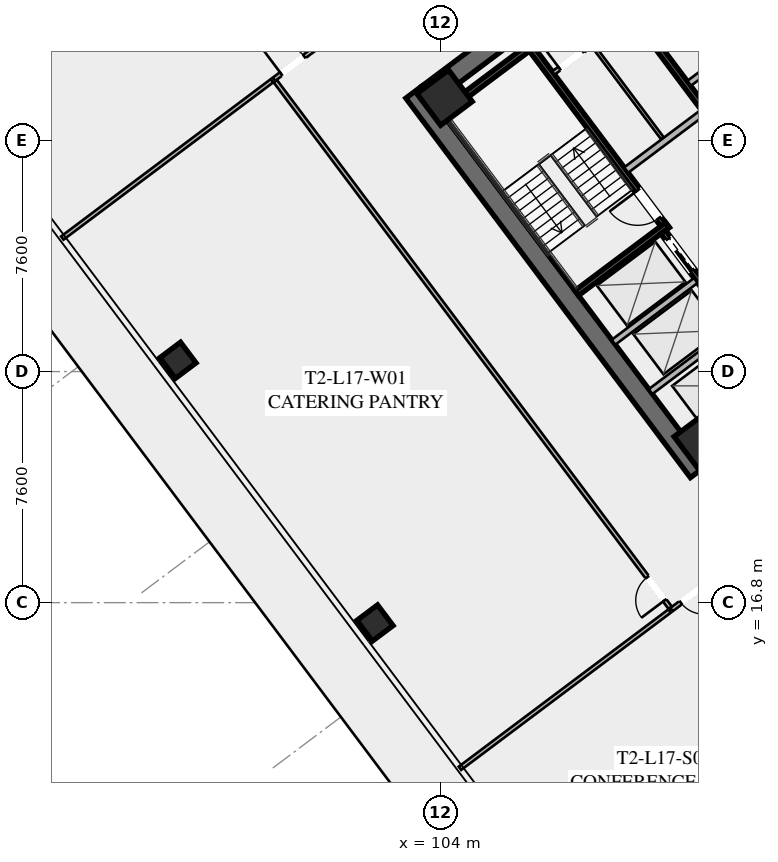
"""IFC4 building model, lengths in metres.
Left out: names, types, materials, properties, quantities, classifications, styles, units other than length and angle.
Written with IfcOpenShell. Run it as: python <this file> out.ifc"""

import sys

from ifc_helpers import new_model, si_unit, direction, frame, frame_2d, origin, origin_2d, place, context, subcontext, project, spatial, rectangle, hollow_rectangle, extrude, element, fill, save


model = new_model("IFC4")
c1 = context("Model", 3, precision=1e-05, world=origin(), true_north=direction((0.0, 1.0)))
c2 = subcontext(c1, "Body", "Model", "MODEL_VIEW")
j1 = project(units=[si_unit("LENGTHUNIT", "METRE"), si_unit("PLANEANGLEUNIT", "RADIAN")], contexts=[c1])
p1 = place(None, origin())
s1 = spatial("IfcSite", under=j1, at=p1, CompositionType="ELEMENT")
p2 = place(p1, origin())
s2 = spatial("IfcBuilding", under=s1, at=p2, CompositionType="ELEMENT")
p3 = place(p2, frame((0.0, 0.0, 67.2)))
s3 = spatial("IfcBuildingStorey", under=s2, at=p3, CompositionType="ELEMENT", Elevation=67.2)
p4 = place(p3, frame((112.476, 21.107, 0.0), z_axis=(0.0, 0.0, 1.0), x_axis=(-0.600005007985, 0.799996243986, 0.0)))
e1 = element("IfcWall", 1, at=p4, inside=s3, PredefinedType="SHEAR", context=c2, shape_type="SweptSolid", body=[
    extrude(rectangle(XDim=15.6, YDim=0.65, at=frame_2d((7.8, 0.0))), origin(), (0.0, 0.0, 1.0), 3.55),
])
p5 = place(p3, frame((124.429, 30.478, 0.0), z_axis=(0.0, 0.0, 1.0), x_axis=(-0.799998028465, -0.600002628705, 0.0)))
e2 = element("IfcWall", 2, at=p5, inside=s3, PredefinedType="SHEAR", context=c2, shape_type="SweptSolid", body=[
    extrude(rectangle(XDim=14.86, YDim=0.65, at=frame_2d((7.43, 0.0))), origin(), (0.0, 0.0, 1.0), 3.55),
])
p6 = place(p5, frame((9.13, 0.0, 0.0)))
e3 = element("IfcOpeningElement", 3, at=p6, cuts=e2, PredefinedType="OPENING", context=c2, shape_type="SweptSolid", body=[
    extrude(rectangle(XDim=1.25, YDim=2.25, at=frame_2d((0.625, 1.125))), frame((0.0, 0.335, 0.0), z_axis=(0.0, -1.0, 0.0), x_axis=(1.0, 0.0, 0.0)), (0.0, 0.0, 1.0), 0.67),
])
p7 = place(p5, frame((4.08, 0.0, 0.0)))
e4 = element("IfcOpeningElement", 4, at=p7, cuts=e2, PredefinedType="OPENING", context=c2, shape_type="SweptSolid", body=[
    extrude(rectangle(XDim=1.25, YDim=2.25, at=frame_2d((0.625, 1.125))), frame((0.0, 0.335, 0.0), z_axis=(0.0, -1.0, 0.0), x_axis=(1.0, 0.0, 0.0)), (0.0, 0.0, 1.0), 0.67),
])
p8 = place(p3, frame((103.571, 33.522, 0.0), z_axis=(0.0, 0.0, 1.0), x_axis=(0.799998028465, 0.600002628705, 0.0)))
e5 = element("IfcWall", 5, at=p8, inside=s3, PredefinedType="SHEAR", context=c2, shape_type="SweptSolid", body=[
    extrude(rectangle(XDim=14.86, YDim=0.65, at=frame_2d((7.43, 0.0))), origin(), (0.0, 0.0, 1.0), 3.55),
])
p9 = place(p8, frame((4.48, 0.0, 0.0)))
e6 = element("IfcOpeningElement", 6, at=p9, cuts=e5, PredefinedType="OPENING", context=c2, shape_type="SweptSolid", body=[
    extrude(rectangle(XDim=1.25, YDim=2.25, at=frame_2d((0.625, 1.125))), frame((0.0, 0.335, 0.0), z_axis=(0.0, -1.0, 0.0), x_axis=(1.0, 0.0, 0.0)), (0.0, 0.0, 1.0), 0.67),
])
p10 = place(p8, frame((9.53, 0.0, 0.0)))
e7 = element("IfcOpeningElement", 7, at=p10, cuts=e5, PredefinedType="OPENING", context=c2, shape_type="SweptSolid", body=[
    extrude(rectangle(XDim=1.25, YDim=2.25, at=frame_2d((0.625, 1.125))), frame((0.0, 0.335, 0.0), z_axis=(0.0, -1.0, 0.0), x_axis=(1.0, 0.0, 0.0)), (0.0, 0.0, 1.0), 0.67),
])
for number, where, z_axis, x_axis in (
    (8, (112.59, 22.13, 0.0), (0.0, 0.0, 1.0), (0.8, 0.6, 0.0)),
    (9, (104.13, 33.41, 0.0), (0.0, 0.0, 1.0), (0.8, 0.6, 0.0)),
):
    element("IfcColumn", number, at=place(p3, frame(where, z_axis=z_axis, x_axis=x_axis)), inside=s3, PredefinedType="COLUMN", context=c2, shape_type="SweptSolid", body=[
        extrude(hollow_rectangle(XDim=1.3, YDim=1.3, WallThickness=0.05, at=origin_2d()), origin(), (0.0, 0.0, 1.0), 3.35),
    ])
for number, where, z_axis, x_axis in (
    (10, (95.36, 24.77, -0.195), (0.0, 0.0, 1.0), (0.8, 0.6, 0.0)),
    (11, (101.84, 16.13, -0.195), (0.0, 0.0, 1.0), (0.8, 0.6, 0.0)),
):
    element("IfcColumn", number, at=place(p3, frame(where, z_axis=z_axis, x_axis=x_axis)), inside=s3, PredefinedType="COLUMN", context=c2, shape_type="SweptSolid", body=[
        extrude(hollow_rectangle(XDim=0.85, YDim=0.85, WallThickness=0.035, at=origin_2d()), origin(), (0.0, 0.0, 1.0), 3.545),
    ])
p11 = place(p3, frame((111.44, 29.08, 0.0), z_axis=(0.0, 0.0, 1.0), x_axis=(-0.600009827119, 0.799992629566, 0.0)))
e12 = element("IfcWall", 12, at=p11, inside=s3, PredefinedType="SHEAR", context=c2, shape_type="SweptSolid", body=[
    extrude(rectangle(XDim=7.95, YDim=0.2, at=frame_2d((3.975, 0.0))), origin(), (0.0, 0.0, 1.0), 3.35),
])
p12 = place(p11, frame((0.45, 0.0, 0.0)))
e13 = element("IfcOpeningElement", 13, at=p12, cuts=e12, PredefinedType="OPENING", context=c2, shape_type="SweptSolid", body=[
    extrude(rectangle(XDim=1.15, YDim=2.2, at=frame_2d((0.575, 1.1))), frame((0.0, 0.11, 0.0), z_axis=(0.0, -1.0, 0.0), x_axis=(1.0, 0.0, 0.0)), (0.0, 0.0, 1.0), 0.22),
])
for number, where, z_axis, x_axis in (
    (14, (108.476, 26.982, 0.0), (0.0, 0.0, 1.0), (0.8, 0.6, 0.0)),
    (15, (104.036, 32.902, 0.0), (0.0, 0.0, 1.0), (0.8, 0.6, 0.0)),
):
    element("IfcWall", number, at=place(p3, frame(where, z_axis=z_axis, x_axis=x_axis)), inside=s3, PredefinedType="SHEAR", context=c2, shape_type="SweptSolid", body=[
        extrude(rectangle(XDim=3.73, YDim=0.2, at=frame_2d((1.865, 0.0))), origin(), (0.0, 0.0, 1.0), 3.35),
    ])
p13 = place(p3, frame((117.938, 26.016, 0.0), z_axis=(0.0, 0.0, 1.0), x_axis=(-0.600005463273, 0.799995902516, 0.0)))
e16 = element("IfcWall", 16, at=p13, inside=s3, PredefinedType="SHEAR", context=c2, shape_type="SweptSolid", body=[
    extrude(rectangle(XDim=14.3, YDim=0.2, at=frame_2d((7.15, 0.0))), origin(), (0.0, 0.0, 1.0), 3.35),
])
p14 = place(p3, frame((110.104, 31.028, 0.0), z_axis=(0.0, 0.0, 1.0), x_axis=(0.800018601094, 0.59997519774, 0.0)))
e17 = element("IfcWall", 17, at=p14, inside=s3, PredefinedType="SOLIDWALL", context=c2, shape_type="SweptSolid", body=[
    extrude(rectangle(XDim=3.15, YDim=0.22, at=frame_2d((1.575, 0.0))), origin(), (0.0, 0.0, 1.0), 2.703),
])
p15 = place(p3, frame((115.13, 23.91, 0.0), z_axis=(0.0, 0.0, 1.0), x_axis=(-0.599975393228, 0.800018454488, 0.0)))
e18 = element("IfcWall", 18, at=p15, inside=s3, PredefinedType="SHEAR", context=c2, shape_type="SweptSolid", body=[
    extrude(rectangle(XDim=6.35, YDim=0.2, at=frame_2d((3.175, 0.0))), origin(), (0.0, 0.0, 1.0), 3.35),
])
p16 = place(p15, frame((4.775, 0.0, 0.0)))
e19 = element("IfcOpeningElement", 19, at=p16, cuts=e18, PredefinedType="OPENING", context=c2, shape_type="SweptSolid", body=[
    extrude(rectangle(XDim=1.3, YDim=2.25, at=frame_2d((0.65, 1.125))), frame((0.0, 0.11, 0.0), z_axis=(0.0, -1.0, 0.0), x_axis=(1.0, 0.0, 0.0)), (0.0, 0.0, 1.0), 0.22),
])
p17 = place(p15, frame((2.775, 0.0, 0.0)))
e20 = element("IfcOpeningElement", 20, at=p17, cuts=e18, PredefinedType="OPENING", context=c2, shape_type="SweptSolid", body=[
    extrude(rectangle(XDim=1.3, YDim=2.25, at=frame_2d((0.65, 1.125))), frame((0.0, 0.11, 0.0), z_axis=(0.0, -1.0, 0.0), x_axis=(1.0, 0.0, 0.0)), (0.0, 0.0, 1.0), 0.22),
])
p18 = place(p15, frame((0.575, 0.0, 0.0)))
e21 = element("IfcOpeningElement", 21, at=p18, cuts=e18, PredefinedType="OPENING", context=c2, shape_type="SweptSolid", body=[
    extrude(rectangle(XDim=1.3, YDim=2.25, at=frame_2d((0.65, 1.125))), frame((0.0, 0.11, 0.0), z_axis=(0.0, -1.0, 0.0), x_axis=(1.0, 0.0, 0.0)), (0.0, 0.0, 1.0), 0.22),
])
for number, where, z_axis, x_axis in (
    (22, (110.906, 23.742, 0.0), (0.0, 0.0, 1.0), (0.8, 0.6, 0.0)),
    (23, (109.688, 25.366, 0.0), (0.0, 0.0, 1.0), (0.8, 0.6, 0.0)),
):
    element("IfcWall", number, at=place(p3, frame(where, z_axis=z_axis, x_axis=x_axis)), inside=s3, PredefinedType="SOLIDWALL", context=c2, shape_type="SweptSolid", body=[
        extrude(rectangle(XDim=3.38, YDim=0.2, at=frame_2d((1.69, 0.0))), origin(), (0.0, 0.0, 1.0), 3.35),
    ])
p19 = place(p3, frame((107.71, 34.22, 0.0), z_axis=(0.0, 0.0, 1.0), x_axis=(0.799981399002, 0.60002480053, 0.0)))
e24 = element("IfcWall", 24, at=p19, inside=s3, PredefinedType="PARTITIONING", context=c2, shape_type="SweptSolid", body=[
    extrude(rectangle(XDim=3.15, YDim=0.135, at=frame_2d((1.575, 0.0))), origin(), (0.0, 0.0, 1.0), 2.703),
])
p20 = place(p19, frame((0.25, 0.0, 0.0)))
e25 = element("IfcOpeningElement", 25, at=p20, cuts=e24, PredefinedType="OPENING", context=c2, shape_type="SweptSolid", body=[
    extrude(rectangle(XDim=0.95, YDim=2.05, at=frame_2d((0.475, 1.025))), frame((0.0, 0.077, 0.0), z_axis=(0.0, -1.0, 0.0), x_axis=(1.0, 0.0, 0.0)), (0.0, 0.0, 1.0), 0.155),
])
p21 = place(p19, frame((1.95, 0.0, 0.0)))
e26 = element("IfcOpeningElement", 26, at=p21, cuts=e24, PredefinedType="OPENING", context=c2, shape_type="SweptSolid", body=[
    extrude(rectangle(XDim=0.95, YDim=2.05, at=frame_2d((0.475, 1.025))), frame((0.0, 0.077, 0.0), z_axis=(0.0, -1.0, 0.0), x_axis=(1.0, 0.0, 0.0)), (0.0, 0.0, 1.0), 0.155),
])
p22 = place(p3, frame((111.296, 32.072, 0.0), z_axis=(0.0, 0.0, 1.0), x_axis=(-0.59995887973, 0.800030838552, 0.0)))
e27 = element("IfcWall", 27, at=p22, inside=s3, PredefinedType="PARTITIONING", context=c2, shape_type="SweptSolid", body=[
    extrude(rectangle(XDim=3.8, YDim=0.11, at=frame_2d((1.9, 0.0))), origin(), (0.0, 0.0, 1.0), 2.703),
])
p23 = place(p3, frame((115.11, 33.27, 0.0), z_axis=(0.0, 0.0, 1.0), x_axis=(-0.600011488909, 0.79999138319, 0.0)))
e28 = element("IfcWall", 28, at=p23, inside=s3, PredefinedType="SOLIDWALL", context=c2, shape_type="SweptSolid", body=[
    extrude(rectangle(XDim=6.8, YDim=0.2, at=frame_2d((3.4, 0.0))), origin(), (0.0, 0.0, 1.0), 3.35),
])
p24 = place(p3, frame((112.176, 33.882, 0.0), z_axis=(0.0, 0.0, 1.0), x_axis=(0.8, 0.6, 0.0)))
e29 = element("IfcWall", 29, at=p24, inside=s3, PredefinedType="SOLIDWALL", context=c2, shape_type="SweptSolid", body=[
    extrude(rectangle(XDim=1.88, YDim=0.2, at=frame_2d((0.94, 0.0))), origin(), (0.0, 0.0, 1.0), 3.35),
])
p25 = place(p3, frame((98.516, 34.012, 0.0), z_axis=(0.0, 0.0, 1.0), x_axis=(0.8, 0.6, 0.0)))
e30 = element("IfcWall", 30, at=p25, inside=s3, PredefinedType="PARTITIONING", context=c2, shape_type="SweptSolid", body=[
    extrude(rectangle(XDim=28.23, YDim=0.135, at=frame_2d((14.115, 0.0))), origin(), (0.0, 0.0, 1.0), 2.703),
])
p26 = place(p25, frame((0.3, 0.0, 0.0)))
e31 = element("IfcOpeningElement", 31, at=p26, cuts=e30, PredefinedType="OPENING", context=c2, shape_type="SweptSolid", body=[
    extrude(rectangle(XDim=0.95, YDim=2.05, at=frame_2d((0.475, 1.025))), frame((0.0, 0.077, 0.0), z_axis=(0.0, -1.0, 0.0), x_axis=(1.0, 0.0, 0.0)), (0.0, 0.0, 1.0), 0.155),
])
p27 = place(p25, frame((6.84, 0.0, 0.0)))
e32 = element("IfcOpeningElement", 32, at=p27, cuts=e30, PredefinedType="OPENING", context=c2, shape_type="SweptSolid", body=[
    extrude(rectangle(XDim=0.95, YDim=2.05, at=frame_2d((0.475, 1.025))), frame((0.0, 0.077, 0.0), z_axis=(0.0, -1.0, 0.0), x_axis=(1.0, 0.0, 0.0)), (0.0, 0.0, 1.0), 0.155),
])
p28 = place(p25, frame((10.863, 0.0, 0.0)))
e33 = element("IfcOpeningElement", 33, at=p28, cuts=e30, PredefinedType="OPENING", context=c2, shape_type="SweptSolid", body=[
    extrude(rectangle(XDim=0.95, YDim=2.05, at=frame_2d((0.475, 1.025))), frame((0.0, 0.077, 0.0), z_axis=(0.0, -1.0, 0.0), x_axis=(1.0, 0.0, 0.0)), (0.0, 0.0, 1.0), 0.155),
])
p29 = place(p25, frame((26.98, 0.0, 0.0)))
e34 = element("IfcOpeningElement", 34, at=p29, cuts=e30, PredefinedType="OPENING", context=c2, shape_type="SweptSolid", body=[
    extrude(rectangle(XDim=0.95, YDim=2.05, at=frame_2d((0.475, 1.025))), frame((0.0, 0.077, 0.0), z_axis=(0.0, -1.0, 0.0), x_axis=(1.0, 0.0, 0.0)), (0.0, 0.0, 1.0), 0.155),
])
p30 = place(p3, frame((134.18, 33.51, 0.0), z_axis=(0.0, 0.0, 1.0), x_axis=(-0.8, -0.6, 0.0)))
e35 = element("IfcWall", 35, at=p30, inside=s3, PredefinedType="PARTITIONING", context=c2, shape_type="SweptSolid", body=[
    extrude(rectangle(XDim=28.23, YDim=0.135, at=frame_2d((14.115, 0.0))), origin(), (0.0, 0.0, 1.0), 2.703),
])
p31 = place(p30, frame((26.9, 0.0, 0.0)))
e36 = element("IfcOpeningElement", 36, at=p31, cuts=e35, PredefinedType="OPENING", context=c2, shape_type="SweptSolid", body=[
    extrude(rectangle(XDim=0.95, YDim=2.05, at=frame_2d((0.475, 1.025))), frame((0.0, 0.077, 0.0), z_axis=(0.0, -1.0, 0.0), x_axis=(1.0, 0.0, 0.0)), (0.0, 0.0, 1.0), 0.155),
])
p32 = place(p30, frame((20.399, 0.0, 0.0)))
e37 = element("IfcOpeningElement", 37, at=p32, cuts=e35, PredefinedType="OPENING", context=c2, shape_type="SweptSolid", body=[
    extrude(rectangle(XDim=0.95, YDim=2.05, at=frame_2d((0.475, 1.025))), frame((0.0, 0.077, 0.0), z_axis=(0.0, -1.0, 0.0), x_axis=(1.0, 0.0, 0.0)), (0.0, 0.0, 1.0), 0.155),
])
p33 = place(p30, frame((16.339, 0.0, 0.0)))
e38 = element("IfcOpeningElement", 38, at=p33, cuts=e35, PredefinedType="OPENING", context=c2, shape_type="SweptSolid", body=[
    extrude(rectangle(XDim=0.95, YDim=2.05, at=frame_2d((0.475, 1.025))), frame((0.0, 0.077, 0.0), z_axis=(0.0, -1.0, 0.0), x_axis=(1.0, 0.0, 0.0)), (0.0, 0.0, 1.0), 0.155),
])
p34 = place(p30, frame((0.38, 0.0, 0.0)))
e39 = element("IfcOpeningElement", 39, at=p34, cuts=e35, PredefinedType="OPENING", context=c2, shape_type="SweptSolid", body=[
    extrude(rectangle(XDim=0.95, YDim=2.05, at=frame_2d((0.475, 1.025))), frame((0.0, 0.077, 0.0), z_axis=(0.0, -1.0, 0.0), x_axis=(1.0, 0.0, 0.0)), (0.0, 0.0, 1.0), 0.155),
])
p35 = place(p3, frame((111.548, 16.636, 0.0), z_axis=(0.0, 0.0, 1.0), x_axis=(-0.600003610192, 0.799997292343, 0.0)))
e40 = element("IfcWall", 40, at=p35, inside=s3, PredefinedType="PARTITIONING", context=c2, shape_type="SweptSolid", body=[
    extrude(rectangle(XDim=21.64, YDim=0.135, at=frame_2d((10.82, 0.0))), origin(), (0.0, 0.0, 1.0), 2.703),
])
p36 = place(p35, frame((0.3, 0.0, 0.0)))
e41 = element("IfcOpeningElement", 41, at=p36, cuts=e40, PredefinedType="OPENING", context=c2, shape_type="SweptSolid", body=[
    extrude(rectangle(XDim=0.95, YDim=2.05, at=frame_2d((0.475, 1.025))), frame((0.0, 0.077, 0.0), z_axis=(0.0, -1.0, 0.0), x_axis=(1.0, 0.0, 0.0)), (0.0, 0.0, 1.0), 0.155),
])
p37 = place(p3, frame((98.452, 33.964, 0.0), z_axis=(0.0, 0.0, 1.0), x_axis=(-0.799993202584, -0.600009063115, 0.0)))
e42 = element("IfcWall", 42, at=p37, inside=s3, PredefinedType="PARTITIONING", context=c2, shape_type="SweptSolid", body=[
    extrude(rectangle(XDim=8.62, YDim=0.135, at=frame_2d((4.31, 0.0))), origin(), (0.0, 0.0, 1.0), 2.703),
])
p38 = place(p3, frame((104.636, 11.352, 0.0), z_axis=(0.0, 0.0, 1.0), x_axis=(0.800006797429, 0.599990936654, 0.0)))
e43 = element("IfcWall", 43, at=p38, inside=s3, PredefinedType="PARTITIONING", context=c2, shape_type="SweptSolid", body=[
    extrude(rectangle(XDim=8.62, YDim=0.135, at=frame_2d((4.31, 0.0))), origin(), (0.0, 0.0, 1.0), 2.703),
])
p39 = place(p12, origin())
e44 = element("IfcDoor", 44, at=p39, inside=s3, OperationType="SINGLE_SWING_RIGHT", PredefinedType="DOOR", context=c2, shape_type="SweptSolid", body=[
    extrude(rectangle(XDim=1.15, YDim=2.2, at=frame_2d((0.575, 1.1))), frame((0.0, 0.025, 0.0), z_axis=(0.0, -1.0, 0.0), x_axis=(1.0, 0.0, 0.0)), (0.0, 0.0, 1.0), 0.05),
])
fill(e13, e44)
p40 = place(p20, origin())
e45 = element("IfcDoor", 45, at=p40, inside=s3, OperationType="SINGLE_SWING_LEFT", PredefinedType="DOOR", context=c2, shape_type="SweptSolid", body=[
    extrude(rectangle(XDim=0.95, YDim=2.05, at=frame_2d((0.475, 1.025))), frame((0.0, 0.025, 0.0), z_axis=(0.0, -1.0, 0.0), x_axis=(1.0, 0.0, 0.0)), (0.0, 0.0, 1.0), 0.05),
])
fill(e25, e45)
p41 = place(p26, origin())
e46 = element("IfcDoor", 46, at=p41, inside=s3, OperationType="SINGLE_SWING_LEFT", PredefinedType="DOOR", context=c2, shape_type="SweptSolid", body=[
    extrude(rectangle(XDim=0.95, YDim=2.05, at=frame_2d((0.475, 1.025))), frame((0.0, 0.025, 0.0), z_axis=(0.0, -1.0, 0.0), x_axis=(1.0, 0.0, 0.0)), (0.0, 0.0, 1.0), 0.05),
])
fill(e31, e46)
p42 = place(p31, origin())
e47 = element("IfcDoor", 47, at=p42, inside=s3, OperationType="SINGLE_SWING_LEFT", PredefinedType="DOOR", context=c2, shape_type="SweptSolid", body=[
    extrude(rectangle(XDim=0.95, YDim=2.05, at=frame_2d((0.475, 1.025))), frame((0.0, 0.025, 0.0), z_axis=(0.0, -1.0, 0.0), x_axis=(1.0, 0.0, 0.0)), (0.0, 0.0, 1.0), 0.05),
])
fill(e36, e47)
p43 = place(p36, origin())
e48 = element("IfcDoor", 48, at=p43, inside=s3, OperationType="SINGLE_SWING_LEFT", PredefinedType="DOOR", context=c2, shape_type="SweptSolid", body=[
    extrude(rectangle(XDim=0.95, YDim=2.05, at=frame_2d((0.475, 1.025))), frame((0.0, 0.025, 0.0), z_axis=(0.0, -1.0, 0.0), x_axis=(1.0, 0.0, 0.0)), (0.0, 0.0, 1.0), 0.05),
])
fill(e41, e48)
p44 = place(p16, origin())
e49 = element("IfcDoor", 49, at=p44, inside=s3, OperationType="SLIDING_TO_LEFT", PredefinedType="DOOR", context=c2, shape_type="SweptSolid", body=[
    extrude(rectangle(XDim=1.3, YDim=2.25, at=frame_2d((0.65, 1.125))), frame((0.0, 0.025, 0.0), z_axis=(0.0, -1.0, 0.0), x_axis=(1.0, 0.0, 0.0)), (0.0, 0.0, 1.0), 0.05),
])
fill(e19, e49)
save(model, sys.argv[1])
